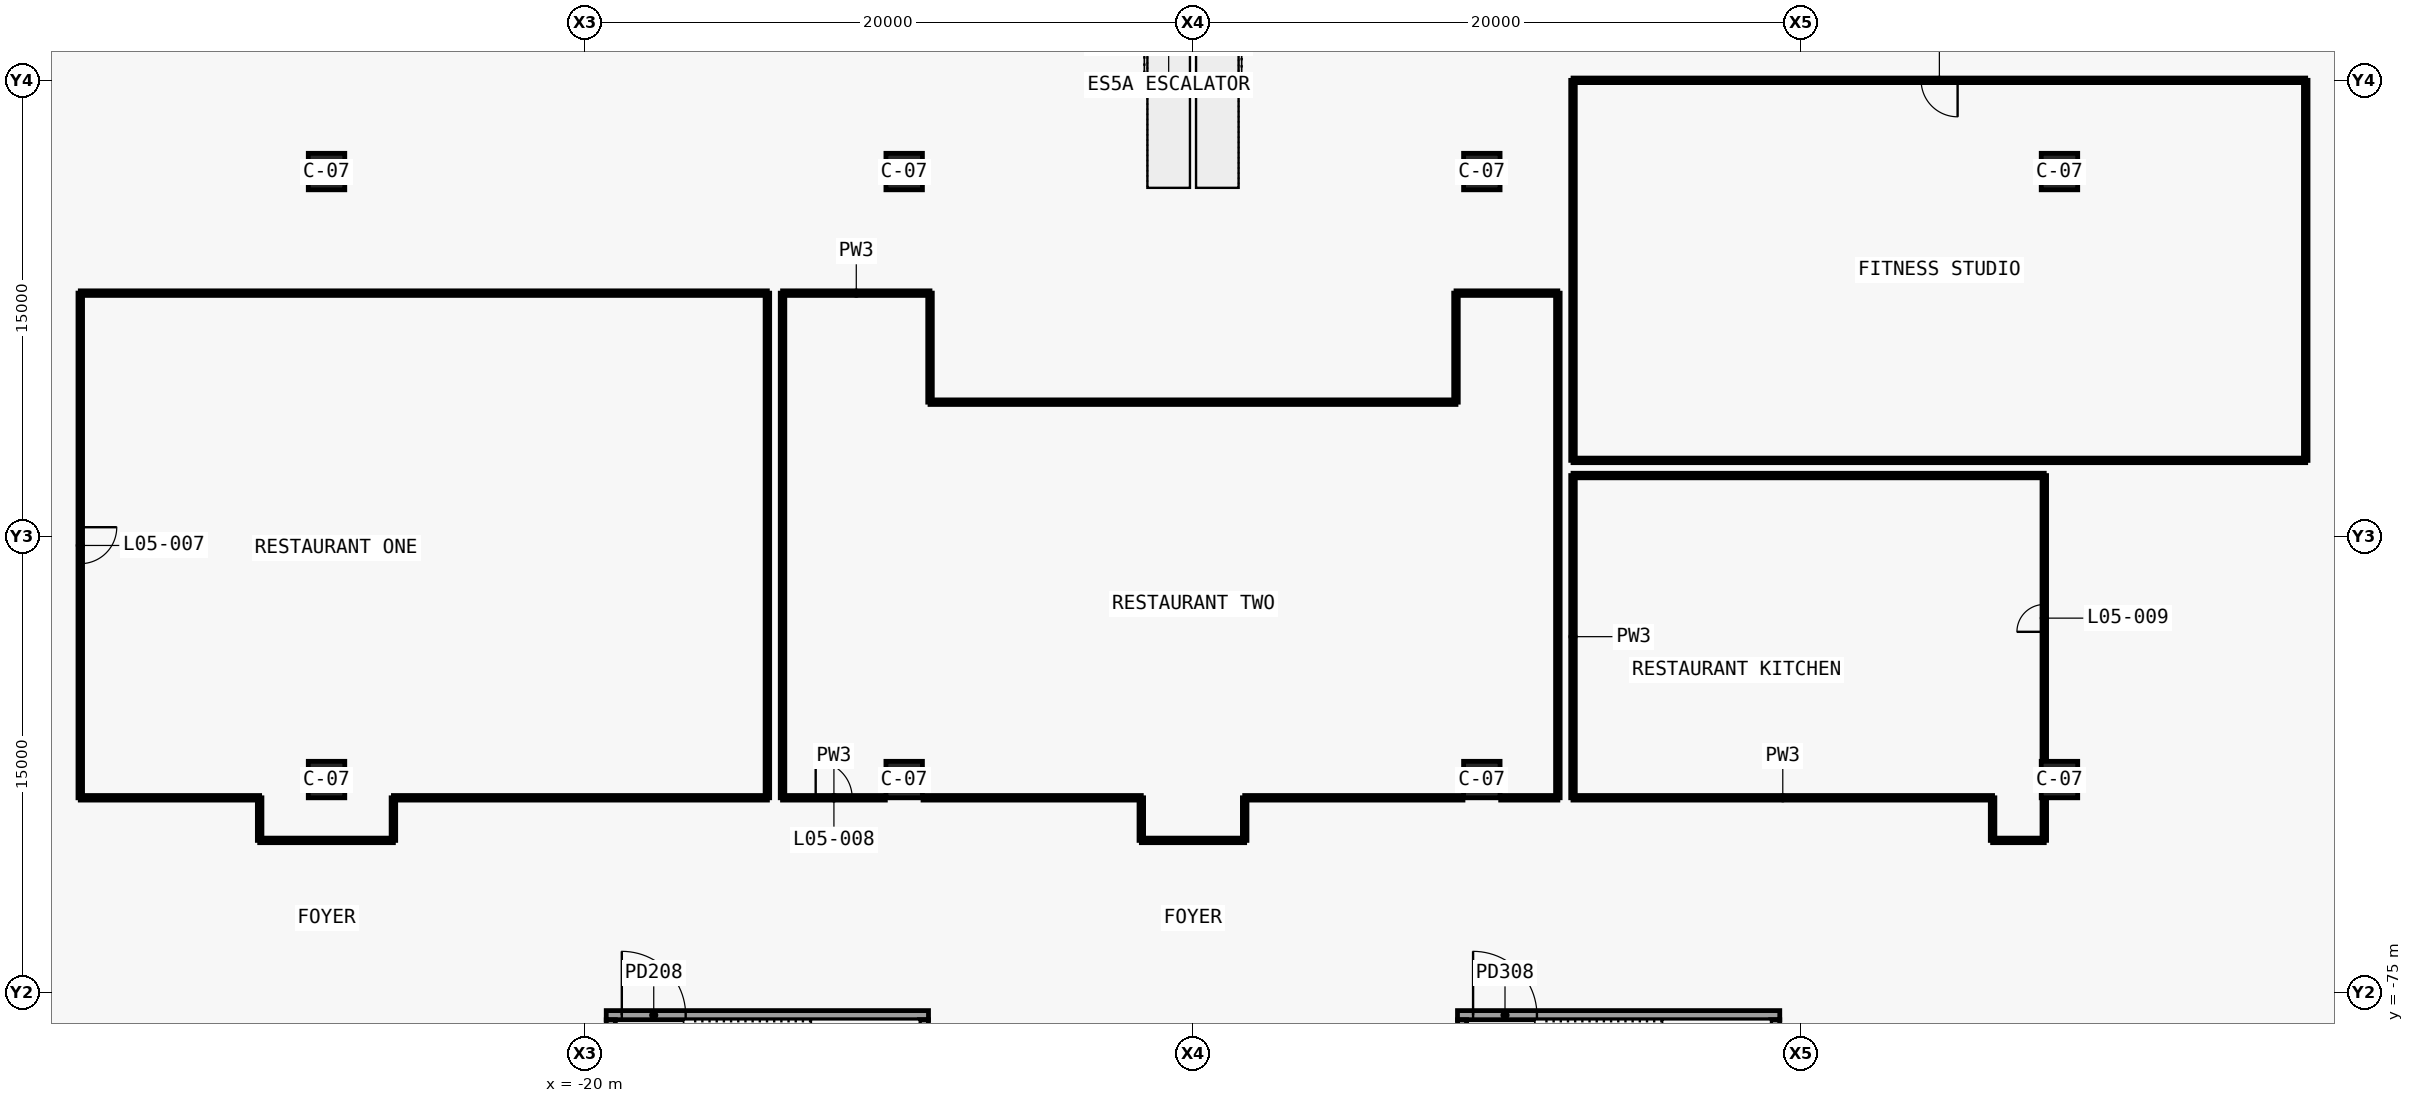
"""IFC4 building model, lengths in metres.
Left out: names, types, materials, properties, quantities, classifications, styles, units other than length and angle.
Written with IfcOpenShell. Run it as: python <this file> out.ifc"""

import sys

from ifc_helpers import new_model, si_unit, direction, frame, frame_2d, origin, origin_2d, place, context, subcontext, project, spatial, rectangle, extrude, element, fill, save


model = new_model("IFC4")
c1 = context("Model", 3, precision=1e-05, world=origin(), true_north=direction((0.0, 1.0)))
c2 = subcontext(c1, "Body", "Model", "MODEL_VIEW")
j1 = project(units=[si_unit("LENGTHUNIT", "METRE"), si_unit("PLANEANGLEUNIT", "RADIAN")], contexts=[c1])
p1 = place(None, origin())
s1 = spatial("IfcSite", under=j1, at=p1, CompositionType="ELEMENT")
p2 = place(p1, origin())
s2 = spatial("IfcBuilding", under=s1, at=p2, CompositionType="ELEMENT")
p3 = place(p2, frame((0.0, 0.0, 37.5)))
s3 = spatial("IfcBuildingStorey", under=s2, at=p3, CompositionType="ELEMENT", Elevation=37.5)
p4 = place(p3, frame((-19.3, -75.75, 0.0), z_axis=(0.0, 0.0, 1.0), x_axis=(1.0, 0.0, 0.0)))
e1 = element("IfcWall", 1, at=p4, inside=s3, PredefinedType="SOLIDWALL", context=c2, shape_type="SweptSolid", body=[
    extrude(rectangle(XDim=10.6, YDim=0.3, at=frame_2d((5.3, 0.0))), origin(), (0.0, 0.0, 1.0), 5.5),
])
p5 = place(p4, frame((0.512, 0.0, 0.0)))
e2 = element("IfcOpeningElement", 2, at=p5, cuts=e1, PredefinedType="OPENING", context=c2, shape_type="SweptSolid", body=[
    extrude(rectangle(XDim=2.1, YDim=2.1, at=frame_2d((1.05, 1.05))), frame((0.0, 0.16, 0.0), z_axis=(0.0, -1.0, 0.0), x_axis=(1.0, 0.0, 0.0)), (0.0, 0.0, 1.0), 0.32),
])
for number, where, z_axis, x_axis in (
    (3, (-19.15, -81.1, 0.0), (0.0, 0.0, 1.0), (0.0, 1.0, 0.0)),
    (4, (-8.85, -81.1, 0.0), (0.0, 0.0, 1.0), (0.0, 1.0, 0.0)),
):
    element("IfcWall", number, at=place(p3, frame(where, z_axis=z_axis, x_axis=x_axis)), inside=s3, PredefinedType="SOLIDWALL", context=c2, shape_type="SweptSolid", body=[
        extrude(rectangle(XDim=5.2, YDim=0.3, at=frame_2d((2.6, 0.0))), origin(), (0.0, 0.0, 1.0), 5.5),
    ])
p6 = place(p3, frame((8.7, -75.75, 0.0), z_axis=(0.0, 0.0, 1.0), x_axis=(1.0, 0.0, 0.0)))
e5 = element("IfcWall", 5, at=p6, inside=s3, PredefinedType="SOLIDWALL", context=c2, shape_type="SweptSolid", body=[
    extrude(rectangle(XDim=10.6, YDim=0.3, at=frame_2d((5.3, 0.0))), origin(), (0.0, 0.0, 1.0), 5.5),
])
p7 = place(p6, frame((0.512, 0.0, 0.0)))
e6 = element("IfcOpeningElement", 6, at=p7, cuts=e5, PredefinedType="OPENING", context=c2, shape_type="SweptSolid", body=[
    extrude(rectangle(XDim=2.1, YDim=2.1, at=frame_2d((1.05, 1.05))), frame((0.0, 0.16, 0.0), z_axis=(0.0, -1.0, 0.0), x_axis=(1.0, 0.0, 0.0)), (0.0, 0.0, 1.0), 0.32),
])
for number, where, z_axis, x_axis in (
    (7, (8.85, -81.1, 0.0), (0.0, 0.0, 1.0), (0.0, 1.0, 0.0)),
    (8, (19.15, -81.1, 0.0), (0.0, 0.0, 1.0), (0.0, 1.0, 0.0)),
):
    element("IfcWall", number, at=place(p3, frame(where, z_axis=z_axis, x_axis=x_axis)), inside=s3, PredefinedType="SOLIDWALL", context=c2, shape_type="SweptSolid", body=[
        extrude(rectangle(XDim=5.2, YDim=0.3, at=frame_2d((2.6, 0.0))), origin(), (0.0, 0.0, 1.0), 5.5),
    ])
for number, where, z_axis, x_axis in (
    (9, (-28.5, -68.0, 0.0), (0.0, 0.0, 1.0), (1.0, 0.0, 0.0)),
    (10, (-9.5, -68.0, 0.0), (0.0, 0.0, 1.0), (1.0, 0.0, 0.0)),
    (11, (9.5, -68.0, 0.0), (0.0, 0.0, 1.0), (1.0, 0.0, 0.0)),
    (12, (28.5, -68.0, 0.0), (0.0, 0.0, 1.0), (1.0, 0.0, 0.0)),
    (13, (-28.5, -48.0, 0.0), (0.0, 0.0, 1.0), (1.0, 0.0, 0.0)),
    (14, (-9.5, -48.0, 0.0), (0.0, 0.0, 1.0), (1.0, 0.0, 0.0)),
    (15, (9.5, -48.0, 0.0), (0.0, 0.0, 1.0), (1.0, 0.0, 0.0)),
    (16, (28.5, -48.0, 0.0), (0.0, 0.0, 1.0), (1.0, 0.0, 0.0)),
):
    element("IfcColumn", number, at=place(p3, frame(where, z_axis=z_axis, x_axis=x_axis)), inside=s3, PredefinedType="COLUMN", context=c2, shape_type="SweptSolid", body=[
        extrude(rectangle(XDim=1.2, YDim=1.2, at=origin_2d()), origin(), (0.0, 0.0, 1.0), 5.5),
    ])
p8 = place(p3, frame((-13.999, -68.599, 0.0), z_axis=(0.0, 0.0, 1.0), x_axis=(0.0, 1.0, 0.0)))
e17 = element("IfcWall", 17, at=p8, inside=s3, PredefinedType="PARTITIONING", context=c2, shape_type="SweptSolid", body=[
    extrude(rectangle(XDim=16.599, YDim=0.15, at=frame_2d((8.3, 0.0))), origin(), (0.0, 0.0, 1.0), 4.28),
])
p9 = place(p3, frame((-14.0, -51.999, 0.0), z_axis=(0.0, 0.0, 1.0), x_axis=(-1.0, 0.0, 0.0)))
e18 = element("IfcWall", 18, at=p9, inside=s3, PredefinedType="PARTITIONING", context=c2, shape_type="SweptSolid", body=[
    extrude(rectangle(XDim=22.599, YDim=0.15, at=frame_2d((11.3, 0.0))), origin(), (0.0, 0.0, 1.0), 4.28),
])
p10 = place(p3, frame((12.001, -68.599, 0.0), z_axis=(0.0, 0.0, 1.0), x_axis=(0.0, 1.0, 0.0)))
e19 = element("IfcWall", 19, at=p10, inside=s3, PredefinedType="PARTITIONING", context=c2, shape_type="SweptSolid", body=[
    extrude(rectangle(XDim=16.599, YDim=0.15, at=frame_2d((8.3, 0.0))), origin(), (0.0, 0.0, 1.0), 4.28),
])
p11 = place(p3, frame((12.0, -51.999, 0.0), z_axis=(0.0, 0.0, 1.0), x_axis=(-1.0, 0.0, 0.0)))
e20 = element("IfcWall", 20, at=p11, inside=s3, PredefinedType="PARTITIONING", context=c2, shape_type="SweptSolid", body=[
    extrude(rectangle(XDim=3.349, YDim=0.15, at=frame_2d((1.675, 0.0))), origin(), (0.0, 0.0, 1.0), 4.28),
])
p12 = place(p3, frame((-8.651, -51.999, 0.0), z_axis=(0.0, 0.0, 1.0), x_axis=(-1.0, 0.0, 0.0)))
e21 = element("IfcWall", 21, at=p12, inside=s3, PredefinedType="PARTITIONING", context=c2, shape_type="SweptSolid", body=[
    extrude(rectangle(XDim=4.849, YDim=0.15, at=frame_2d((2.425, 0.0))), origin(), (0.0, 0.0, 1.0), 4.28),
])
p13 = place(p3, frame((-13.501, -52.0, 0.0), z_axis=(0.0, 0.0, 1.0), x_axis=(0.0, -1.0, 0.0)))
e22 = element("IfcWall", 22, at=p13, inside=s3, PredefinedType="PARTITIONING", context=c2, shape_type="SweptSolid", body=[
    extrude(rectangle(XDim=16.599, YDim=0.15, at=frame_2d((8.3, 0.0))), origin(), (0.0, 0.0, 1.0), 4.28),
])
p14 = place(p3, frame((26.301, -70.001, 0.0), z_axis=(0.0, 0.0, 1.0), x_axis=(1.0, 0.0, 0.0)))
e23 = element("IfcWall", 23, at=p14, inside=s3, PredefinedType="PARTITIONING", context=c2, shape_type="SweptSolid", body=[
    extrude(rectangle(XDim=1.699, YDim=0.15, at=frame_2d((0.85, 0.0))), origin(), (0.0, 0.0, 1.0), 5.1),
])
p15 = place(p3, frame((28.001, -70.0, 0.0), z_axis=(0.0, 0.0, 1.0), x_axis=(0.0, 1.0, 0.0)))
e24 = element("IfcWall", 24, at=p15, inside=s3, PredefinedType="PARTITIONING", context=c2, shape_type="SweptSolid", body=[
    extrude(rectangle(XDim=1.38, YDim=0.15, at=frame_2d((0.69, 0.0))), origin(), (0.0, 0.0, 1.0), 5.1),
])
p16 = place(p3, frame((28.001, -67.38, 0.0), z_axis=(0.0, 0.0, 1.0), x_axis=(0.0, 1.0, 0.0)))
e25 = element("IfcWall", 25, at=p16, inside=s3, PredefinedType="PARTITIONING", context=c2, shape_type="SweptSolid", body=[
    extrude(rectangle(XDim=9.38, YDim=0.15, at=frame_2d((4.69, 0.0))), origin(), (0.0, 0.0, 1.0), 4.63),
])
p17 = place(p16, frame((4.24, 0.0, 0.0)))
e26 = element("IfcOpeningElement", 26, at=p17, cuts=e25, PredefinedType="OPENING", context=c2, shape_type="SweptSolid", body=[
    extrude(rectangle(XDim=0.9, YDim=2.1, at=frame_2d((0.45, 1.05))), frame((0.0, 0.085, 0.0), z_axis=(0.0, -1.0, 0.0), x_axis=(1.0, 0.0, 0.0)), (0.0, 0.0, 1.0), 0.17),
])
p18 = place(p3, frame((28.0, -57.999, 0.0), z_axis=(0.0, 0.0, 1.0), x_axis=(-1.0, 0.0, 0.0)))
e27 = element("IfcWall", 27, at=p18, inside=s3, PredefinedType="PARTITIONING", context=c2, shape_type="SweptSolid", body=[
    extrude(rectangle(XDim=15.5, YDim=0.15, at=frame_2d((7.75, 0.0))), origin(), (0.0, 0.0, 1.0), 5.1),
])
p19 = place(p3, frame((12.499, -58.0, 0.0), z_axis=(0.0, 0.0, 1.0), x_axis=(0.0, -1.0, 0.0)))
e28 = element("IfcWall", 28, at=p19, inside=s3, PredefinedType="PARTITIONING", context=c2, shape_type="SweptSolid", body=[
    extrude(rectangle(XDim=10.599, YDim=0.15, at=frame_2d((5.3, 0.0))), origin(), (0.0, 0.0, 1.0), 4.28),
])
p20 = place(p3, frame((36.599, -44.999, 0.0), z_axis=(0.0, 0.0, 1.0), x_axis=(-1.0, 0.0, 0.0)))
e29 = element("IfcWall", 29, at=p20, inside=s3, PredefinedType="PARTITIONING", context=c2, shape_type="SweptSolid", body=[
    extrude(rectangle(XDim=24.099, YDim=0.15, at=frame_2d((12.05, 0.0))), origin(), (0.0, 0.0, 1.0), 5.1),
])
p21 = place(p20, frame((11.449, 0.0, 0.0)))
e30 = element("IfcOpeningElement", 30, at=p21, cuts=e29, PredefinedType="OPENING", context=c2, shape_type="SweptSolid", body=[
    extrude(rectangle(XDim=1.2, YDim=2.4, at=frame_2d((0.6, 1.2))), frame((0.0, 0.085, 0.0), z_axis=(0.0, -1.0, 0.0), x_axis=(1.0, 0.0, 0.0)), (0.0, 0.0, 1.0), 0.17),
])
p22 = place(p3, frame((12.499, -45.0, 0.0), z_axis=(0.0, 0.0, 1.0), x_axis=(0.0, -1.0, 0.0)))
e31 = element("IfcWall", 31, at=p22, inside=s3, PredefinedType="PARTITIONING", context=c2, shape_type="SweptSolid", body=[
    extrude(rectangle(XDim=12.5, YDim=0.15, at=frame_2d((6.25, 0.0))), origin(), (0.0, 0.0, 1.0), 4.28),
])
p23 = place(p3, frame((12.5, -57.501, 0.0), z_axis=(0.0, 0.0, 1.0), x_axis=(1.0, 0.0, 0.0)))
e32 = element("IfcWall", 32, at=p23, inside=s3, PredefinedType="PARTITIONING", context=c2, shape_type="SweptSolid", body=[
    extrude(rectangle(XDim=24.099, YDim=0.15, at=frame_2d((12.05, 0.0))), origin(), (0.0, 0.0, 1.0), 4.28),
])
p24 = place(p3, frame((-1.699, -70.001, 0.0), z_axis=(0.0, 0.0, 1.0), x_axis=(1.0, 0.0, 0.0)))
e33 = element("IfcWall", 33, at=p24, inside=s3, PredefinedType="PARTITIONING", context=c2, shape_type="SweptSolid", body=[
    extrude(rectangle(XDim=3.398, YDim=0.15, at=frame_2d((1.699, 0.0))), origin(), (0.0, 0.0, 1.0), 5.1),
])
p25 = place(p3, frame((-30.699, -70.001, 0.0), z_axis=(0.0, 0.0, 1.0), x_axis=(1.0, 0.0, 0.0)))
e34 = element("IfcWall", 34, at=p25, inside=s3, PredefinedType="PARTITIONING", context=c2, shape_type="SweptSolid", body=[
    extrude(rectangle(XDim=4.398, YDim=0.15, at=frame_2d((2.199, 0.0))), origin(), (0.0, 0.0, 1.0), 4.28),
])
p26 = place(p3, frame((-36.6, -51.998, 0.0), z_axis=(0.0, 0.0, 1.0), x_axis=(0.0, -1.0, 0.0)))
e35 = element("IfcWall", 35, at=p26, inside=s3, PredefinedType="PARTITIONING", context=c2, shape_type="SweptSolid", body=[
    extrude(rectangle(XDim=16.602, YDim=0.15, at=frame_2d((8.301, 0.0))), origin(), (0.0, 0.0, 1.0), 4.28),
])
p27 = place(p26, frame((7.701, 0.0, 0.0)))
e36 = element("IfcOpeningElement", 36, at=p27, cuts=e35, PredefinedType="OPENING", context=c2, shape_type="SweptSolid", body=[
    extrude(rectangle(XDim=1.2, YDim=2.4, at=frame_2d((0.6, 1.2))), frame((0.0, 0.085, 0.0), z_axis=(0.0, -1.0, 0.0), x_axis=(1.0, 0.0, 0.0)), (0.0, 0.0, 1.0), 0.17),
])
p28 = place(p3, frame((-36.6, -68.6, 0.0), z_axis=(0.0, 0.0, 1.0), x_axis=(1.0, 0.0, 0.0)))
e37 = element("IfcWall", 37, at=p28, inside=s3, PredefinedType="PARTITIONING", context=c2, shape_type="SweptSolid", body=[
    extrude(rectangle(XDim=5.9, YDim=0.15, at=frame_2d((2.95, 0.0))), origin(), (0.0, 0.0, 1.0), 5.1),
])
for number, where, z_axis, x_axis in (
    (38, (-30.7, -68.6, 0.0), (0.0, 0.0, 1.0), (0.0, -1.0, 0.0)),
    (39, (-26.3, -70.002, 0.0), (0.0, 0.0, 1.0), (0.0, 1.0, 0.0)),
):
    element("IfcWall", number, at=place(p3, frame(where, z_axis=z_axis, x_axis=x_axis)), inside=s3, PredefinedType="PARTITIONING", context=c2, shape_type="SweptSolid", body=[
        extrude(rectangle(XDim=1.402, YDim=0.15, at=frame_2d((0.701, 0.0))), origin(), (0.0, 0.0, 1.0), 5.1),
    ])
p29 = place(p3, frame((-26.3, -68.6, 0.0), z_axis=(0.0, 0.0, 1.0), x_axis=(1.0, 0.0, 0.0)))
e40 = element("IfcWall", 40, at=p29, inside=s3, PredefinedType="PARTITIONING", context=c2, shape_type="SweptSolid", body=[
    extrude(rectangle(XDim=12.302, YDim=0.15, at=frame_2d((6.151, 0.0))), origin(), (0.0, 0.0, 1.0), 5.1),
])
p30 = place(p3, frame((-13.502, -68.6, 0.0), z_axis=(0.0, 0.0, 1.0), x_axis=(1.0, 0.0, 0.0)))
e41 = element("IfcWall", 41, at=p30, inside=s3, PredefinedType="PARTITIONING", context=c2, shape_type="SweptSolid", body=[
    extrude(rectangle(XDim=3.382, YDim=0.15, at=frame_2d((1.691, 0.0))), origin(), (0.0, 0.0, 1.0), 5.1),
])
p31 = place(p30, frame((1.091, 0.0, 0.0)))
e42 = element("IfcOpeningElement", 42, at=p31, cuts=e41, PredefinedType="OPENING", context=c2, shape_type="SweptSolid", body=[
    extrude(rectangle(XDim=1.2, YDim=2.4, at=frame_2d((0.6, 1.2))), frame((0.0, 0.085, 0.0), z_axis=(0.0, -1.0, 0.0), x_axis=(1.0, 0.0, 0.0)), (0.0, 0.0, 1.0), 0.17),
])
p32 = place(p3, frame((-8.88, -68.6, 0.0), z_axis=(0.0, 0.0, 1.0), x_axis=(1.0, 0.0, 0.0)))
e43 = element("IfcWall", 43, at=p32, inside=s3, PredefinedType="PARTITIONING", context=c2, shape_type="SweptSolid", body=[
    extrude(rectangle(XDim=7.18, YDim=0.15, at=frame_2d((3.59, 0.0))), origin(), (0.0, 0.0, 1.0), 5.1),
])
for number, where, z_axis, x_axis in (
    (44, (-1.7, -68.6, 0.0), (0.0, 0.0, 1.0), (0.0, -1.0, 0.0)),
    (45, (1.7, -70.002, 0.0), (0.0, 0.0, 1.0), (0.0, 1.0, 0.0)),
):
    element("IfcWall", number, at=place(p3, frame(where, z_axis=z_axis, x_axis=x_axis)), inside=s3, PredefinedType="PARTITIONING", context=c2, shape_type="SweptSolid", body=[
        extrude(rectangle(XDim=1.402, YDim=0.15, at=frame_2d((0.701, 0.0))), origin(), (0.0, 0.0, 1.0), 5.1),
    ])
p33 = place(p3, frame((1.7, -68.6, 0.0), z_axis=(0.0, 0.0, 1.0), x_axis=(1.0, 0.0, 0.0)))
e46 = element("IfcWall", 46, at=p33, inside=s3, PredefinedType="PARTITIONING", context=c2, shape_type="SweptSolid", body=[
    extrude(rectangle(XDim=7.18, YDim=0.15, at=frame_2d((3.59, 0.0))), origin(), (0.0, 0.0, 1.0), 5.1),
])
p34 = place(p3, frame((10.12, -68.6, 0.0), z_axis=(0.0, 0.0, 1.0), x_axis=(1.0, 0.0, 0.0)))
e47 = element("IfcWall", 47, at=p34, inside=s3, PredefinedType="PARTITIONING", context=c2, shape_type="SweptSolid", body=[
    extrude(rectangle(XDim=1.882, YDim=0.15, at=frame_2d((0.941, 0.0))), origin(), (0.0, 0.0, 1.0), 5.1),
])
p35 = place(p3, frame((12.498, -68.6, 0.0), z_axis=(0.0, 0.0, 1.0), x_axis=(1.0, 0.0, 0.0)))
e48 = element("IfcWall", 48, at=p35, inside=s3, PredefinedType="PARTITIONING", context=c2, shape_type="SweptSolid", body=[
    extrude(rectangle(XDim=13.802, YDim=0.15, at=frame_2d((6.901, 0.0))), origin(), (0.0, 0.0, 1.0), 5.1),
])
p36 = place(p3, frame((26.3, -68.6, 0.0), z_axis=(0.0, 0.0, 1.0), x_axis=(0.0, -1.0, 0.0)))
e49 = element("IfcWall", 49, at=p36, inside=s3, PredefinedType="PARTITIONING", context=c2, shape_type="SweptSolid", body=[
    extrude(rectangle(XDim=1.402, YDim=0.15, at=frame_2d((0.701, 0.0))), origin(), (0.0, 0.0, 1.0), 5.1),
])
p37 = place(p3, frame((36.6, -57.502, 0.0), z_axis=(0.0, 0.0, 1.0), x_axis=(0.0, 1.0, 0.0)))
e50 = element("IfcWall", 50, at=p37, inside=s3, PredefinedType="PARTITIONING", context=c2, shape_type="SweptSolid", body=[
    extrude(rectangle(XDim=12.503, YDim=0.15, at=frame_2d((6.252, 0.0))), origin(), (0.0, 0.0, 1.0), 4.28),
])
p38 = place(p3, frame((8.65, -55.586, 0.0), z_axis=(0.0, 0.0, 1.0), x_axis=(-1.0, 0.0, 0.0)))
e51 = element("IfcWall", 51, at=p38, inside=s3, PredefinedType="PARTITIONING", context=c2, shape_type="SweptSolid", body=[
    extrude(rectangle(XDim=17.3, YDim=0.15, at=frame_2d((8.65, 0.0))), origin(), (0.0, 0.0, 1.0), 5.1),
])
for number, where, z_axis, x_axis in (
    (52, (-8.65, -55.586, 0.0), (0.0, 0.0, 1.0), (0.0, 1.0, 0.0)),
    (53, (8.65, -51.998, 0.0), (0.0, 0.0, 1.0), (0.0, -1.0, 0.0)),
):
    element("IfcWall", number, at=place(p3, frame(where, z_axis=z_axis, x_axis=x_axis)), inside=s3, PredefinedType="PARTITIONING", context=c2, shape_type="SweptSolid", body=[
        extrude(rectangle(XDim=3.588, YDim=0.15, at=frame_2d((1.794, 0.0))), origin(), (0.0, 0.0, 1.0), 4.63),
    ])
p39 = place(p5, origin())
e54 = element("IfcDoor", 54, at=p39, inside=s3, OperationType="DOUBLE_DOOR_SINGLE_SWING", PredefinedType="DOOR", context=c2, shape_type="SweptSolid", body=[
    extrude(rectangle(XDim=2.1, YDim=2.1, at=frame_2d((1.05, 1.05))), frame((0.0, 0.025, 0.0), z_axis=(0.0, -1.0, 0.0), x_axis=(1.0, 0.0, 0.0)), (0.0, 0.0, 1.0), 0.05),
])
fill(e2, e54)
p40 = place(p7, origin())
e55 = element("IfcDoor", 55, at=p40, inside=s3, OperationType="DOUBLE_DOOR_SINGLE_SWING", PredefinedType="DOOR", context=c2, shape_type="SweptSolid", body=[
    extrude(rectangle(XDim=2.1, YDim=2.1, at=frame_2d((1.05, 1.05))), frame((0.0, 0.025, 0.0), z_axis=(0.0, -1.0, 0.0), x_axis=(1.0, 0.0, 0.0)), (0.0, 0.0, 1.0), 0.05),
])
fill(e6, e55)
p41 = place(p27, origin())
e56 = element("IfcDoor", 56, at=p41, inside=s3, OperationType="DOUBLE_DOOR_SINGLE_SWING", PredefinedType="DOOR", context=c2, shape_type="SweptSolid", body=[
    extrude(rectangle(XDim=1.2, YDim=2.4, at=frame_2d((0.6, 1.2))), frame((0.0, 0.025, 0.0), z_axis=(0.0, -1.0, 0.0), x_axis=(1.0, 0.0, 0.0)), (0.0, 0.0, 1.0), 0.05),
])
fill(e36, e56)
p42 = place(p31, origin())
e57 = element("IfcDoor", 57, at=p42, inside=s3, OperationType="DOUBLE_DOOR_SINGLE_SWING", PredefinedType="DOOR", context=c2, shape_type="SweptSolid", body=[
    extrude(rectangle(XDim=1.2, YDim=2.4, at=frame_2d((0.6, 1.2))), frame((0.0, 0.025, 0.0), z_axis=(0.0, -1.0, 0.0), x_axis=(1.0, 0.0, 0.0)), (0.0, 0.0, 1.0), 0.05),
])
fill(e42, e57)
p43 = place(p17, origin())
e58 = element("IfcDoor", 58, at=p43, inside=s3, OperationType="SINGLE_SWING_RIGHT", PredefinedType="DOOR", context=c2, shape_type="SweptSolid", body=[
    extrude(rectangle(XDim=0.9, YDim=2.1, at=frame_2d((0.45, 1.05))), frame((0.0, 0.025, 0.0), z_axis=(0.0, -1.0, 0.0), x_axis=(1.0, 0.0, 0.0)), (0.0, 0.0, 1.0), 0.05),
])
fill(e26, e58)
p44 = place(p21, origin())
e59 = element("IfcDoor", 59, at=p44, inside=s3, OperationType="DOUBLE_DOOR_SINGLE_SWING", PredefinedType="DOOR", context=c2, shape_type="SweptSolid", body=[
    extrude(rectangle(XDim=1.2, YDim=2.4, at=frame_2d((0.6, 1.2))), frame((0.0, 0.025, 0.0), z_axis=(0.0, -1.0, 0.0), x_axis=(1.0, 0.0, 0.0)), (0.0, 0.0, 1.0), 0.05),
])
fill(e30, e59)
save(model, sys.argv[1])
